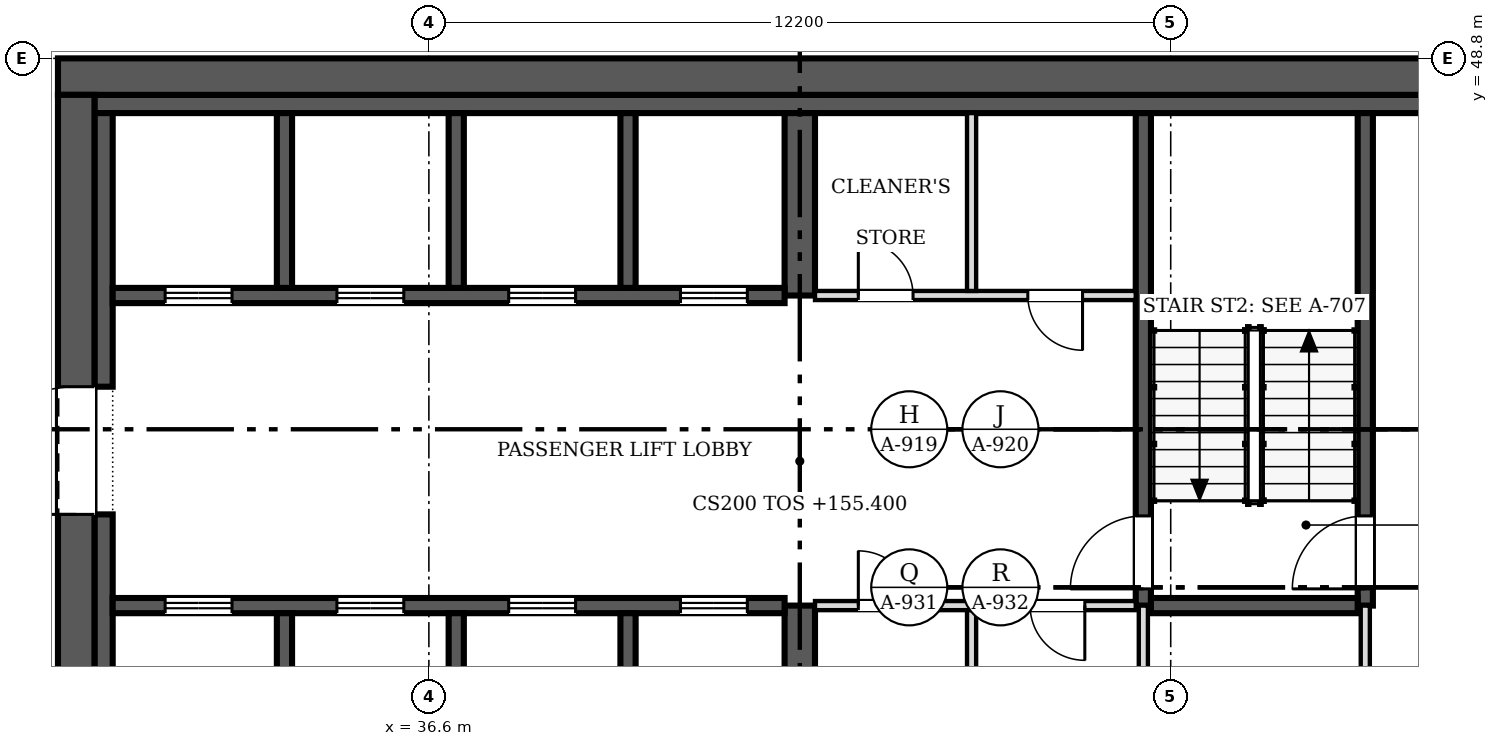
"""IFC4 building model, lengths in metres.
Left out: names, types, materials, properties, quantities, classifications, styles, units other than length and angle.
Written with IfcOpenShell. Run it as: python <this file> out.ifc"""

import sys

from ifc_helpers import new_model, si_unit, direction, frame, frame_2d, origin, place, context, subcontext, project, spatial, rectangle, extrude, source, transform, mapped, element, fill, save


model = new_model("IFC4")
c1 = context("Model", 3, precision=1e-05, world=origin(), true_north=direction((0.0, 1.0)))
c2 = subcontext(c1, "Body", "Model", "MODEL_VIEW")
j1 = project(units=[si_unit("LENGTHUNIT", "METRE"), si_unit("PLANEANGLEUNIT", "RADIAN")], contexts=[c1])
p1 = place(None, origin())
s1 = spatial("IfcSite", under=j1, at=p1, CompositionType="ELEMENT")
p2 = place(p1, origin())
s2 = spatial("IfcBuilding", under=s1, at=p2, CompositionType="ELEMENT")
p3 = place(p2, frame((0.0, 0.0, 155.4)))
s3 = spatial("IfcBuildingStorey", under=s2, at=p3, CompositionType="ELEMENT", Elevation=155.4)
p4 = place(p3, frame((30.8, 25.0, 0.0), z_axis=(0.0, 0.0, 1.0), x_axis=(0.0, 1.0, 0.0)))
e1 = element("IfcWall", 1, at=p4, inside=s3, PredefinedType="SHEAR", context=c2, shape_type="SweptSolid", body=[
    extrude(rectangle(XDim=23.2, YDim=0.6, at=frame_2d((11.6, 0.0))), origin(), (0.0, 0.0, 1.0), 3.8),
])
m1 = source(origin(), c2, "Body", "SweptSolid", [
    extrude(rectangle(XDim=2.1, YDim=2.4, at=frame_2d((1.05, 1.2))), frame((0.0, 0.31, 0.0), z_axis=(0.0, -1.0, 0.0), x_axis=(1.0, 0.0, 0.0)), (0.0, 0.0, 1.0), 0.62),
])
p5 = place(p4, frame((4.8, 0.0, 0.0)))
e2 = element("IfcOpeningElement", 2, at=p5, cuts=e1, PredefinedType="OPENING", context=c2, shape_type="MappedRepresentation", body=[
    mapped(m1, transform((0.0, 0.0, 0.0), scale=1.0)),
])
p6 = place(p4, frame((16.3, 0.0, 0.0)))
e3 = element("IfcOpeningElement", 3, at=p6, cuts=e1, PredefinedType="OPENING", context=c2, shape_type="MappedRepresentation", body=[
    mapped(m1, transform((0.0, 0.0, 0.0), scale=1.0)),
])
p7 = place(p3, frame((30.5, 48.5, 0.0), z_axis=(0.0, 0.0, 1.0), x_axis=(1.0, 0.0, 0.0)))
e4 = element("IfcWall", 4, at=p7, inside=s3, PredefinedType="SHEAR", context=c2, shape_type="SweptSolid", body=[
    extrude(rectangle(XDim=24.4, YDim=0.6, at=frame_2d((12.2, 0.0))), origin(), (0.0, 0.0, 1.0), 3.8),
])
p8 = place(p3, frame((31.1, 48.05, 0.0), z_axis=(0.0, 0.0, 1.0), x_axis=(1.0, 0.0, 0.0)))
e5 = element("IfcWall", 5, at=p8, inside=s3, PredefinedType="SOLIDWALL", context=c2, shape_type="SweptSolid", body=[
    extrude(rectangle(XDim=23.2, YDim=0.3, at=frame_2d((11.6, 0.0))), origin(), (0.0, 0.0, 1.0), 3.8),
])
p9 = place(p3, frame((31.25, 31.9, 0.0), z_axis=(0.0, 0.0, 1.0), x_axis=(0.0, 1.0, 0.0)))
e6 = element("IfcWall", 6, at=p9, inside=s3, PredefinedType="SOLIDWALL", context=c2, shape_type="SweptSolid", body=[
    extrude(rectangle(XDim=9.4, YDim=0.3, at=frame_2d((4.7, 0.0))), origin(), (0.0, 0.0, 1.0), 3.8),
])
p10 = place(p3, frame((31.25, 43.4, 0.0), z_axis=(0.0, 0.0, 1.0), x_axis=(0.0, 1.0, 0.0)))
e7 = element("IfcWall", 7, at=p10, inside=s3, PredefinedType="SOLIDWALL", context=c2, shape_type="SweptSolid", body=[
    extrude(rectangle(XDim=4.5, YDim=0.3, at=frame_2d((2.25, 0.0))), origin(), (0.0, 0.0, 1.0), 3.8),
])
p11 = place(p3, frame((42.7, 36.85, 0.0), z_axis=(0.0, 0.0, 1.0), x_axis=(0.0, 1.0, 0.0)))
e8 = element("IfcWall", 8, at=p11, inside=s3, PredefinedType="SHEAR", context=c2, shape_type="SweptSolid", body=[
    extrude(rectangle(XDim=2.95, YDim=0.5, at=frame_2d((1.475, 0.0))), origin(), (0.0, 0.0, 1.0), 3.8),
])
p12 = place(p3, frame((42.7, 44.9, 0.0), z_axis=(0.0, 0.0, 1.0), x_axis=(0.0, 1.0, 0.0)))
e9 = element("IfcWall", 9, at=p12, inside=s3, PredefinedType="SHEAR", context=c2, shape_type="SweptSolid", body=[
    extrude(rectangle(XDim=3.0, YDim=0.5, at=frame_2d((1.5, 0.0))), origin(), (0.0, 0.0, 1.0), 3.8),
])
p13 = place(p3, frame((31.4, 39.8, 0.0), z_axis=(0.0, 0.0, 1.0), x_axis=(1.0, 0.0, 0.0)))
e10 = element("IfcWall", 10, at=p13, inside=s3, PredefinedType="SOLIDWALL", context=c2, shape_type="SweptSolid", body=[
    extrude(rectangle(XDim=11.05, YDim=0.25, at=frame_2d((5.525, 0.0))), origin(), (0.0, 0.0, 1.0), 3.8),
])
m2 = source(origin(), c2, "Body", "SweptSolid", [
    extrude(rectangle(XDim=1.1, YDim=2.1, at=frame_2d((0.55, 1.05))), frame((0.0, 0.135, 0.0), z_axis=(0.0, -1.0, 0.0), x_axis=(1.0, 0.0, 0.0)), (0.0, 0.0, 1.0), 0.27),
])
p14 = place(p13, frame((0.863, 0.0, 0.0)))
e11 = element("IfcOpeningElement", 11, at=p14, cuts=e10, PredefinedType="OPENING", context=c2, shape_type="MappedRepresentation", body=[
    mapped(m2, transform((0.0, 0.0, 0.0), scale=1.0)),
])
p15 = place(p13, frame((3.688, 0.0, 0.0)))
e12 = element("IfcOpeningElement", 12, at=p15, cuts=e10, PredefinedType="OPENING", context=c2, shape_type="MappedRepresentation", body=[
    mapped(m2, transform((0.0, 0.0, 0.0), scale=1.0)),
])
p16 = place(p13, frame((6.512, 0.0, 0.0)))
e13 = element("IfcOpeningElement", 13, at=p16, cuts=e10, PredefinedType="OPENING", context=c2, shape_type="MappedRepresentation", body=[
    mapped(m2, transform((0.0, 0.0, 0.0), scale=1.0)),
])
p17 = place(p13, frame((9.337, 0.0, 0.0)))
e14 = element("IfcOpeningElement", 14, at=p17, cuts=e10, PredefinedType="OPENING", context=c2, shape_type="MappedRepresentation", body=[
    mapped(m2, transform((0.0, 0.0, 0.0), scale=1.0)),
])
p18 = place(p3, frame((42.45, 44.9, 0.0), z_axis=(0.0, 0.0, 1.0), x_axis=(-1.0, 0.0, 0.0)))
e15 = element("IfcWall", 15, at=p18, inside=s3, PredefinedType="SOLIDWALL", context=c2, shape_type="SweptSolid", body=[
    extrude(rectangle(XDim=11.05, YDim=0.25, at=frame_2d((5.525, 0.0))), origin(), (0.0, 0.0, 1.0), 3.8),
])
p19 = place(p18, frame((9.087, 0.0, 0.0)))
e16 = element("IfcOpeningElement", 16, at=p19, cuts=e15, PredefinedType="OPENING", context=c2, shape_type="MappedRepresentation", body=[
    mapped(m2, transform((0.0, 0.0, 0.0), scale=1.0)),
])
p20 = place(p18, frame((6.262, 0.0, 0.0)))
e17 = element("IfcOpeningElement", 17, at=p20, cuts=e15, PredefinedType="OPENING", context=c2, shape_type="MappedRepresentation", body=[
    mapped(m2, transform((0.0, 0.0, 0.0), scale=1.0)),
])
p21 = place(p18, frame((3.438, 0.0, 0.0)))
e18 = element("IfcOpeningElement", 18, at=p21, cuts=e15, PredefinedType="OPENING", context=c2, shape_type="MappedRepresentation", body=[
    mapped(m2, transform((0.0, 0.0, 0.0), scale=1.0)),
])
p22 = place(p18, frame((0.613, 0.0, 0.0)))
e19 = element("IfcOpeningElement", 19, at=p22, cuts=e15, PredefinedType="OPENING", context=c2, shape_type="MappedRepresentation", body=[
    mapped(m2, transform((0.0, 0.0, 0.0), scale=1.0)),
])
p23 = place(p3, frame((48.35, 47.9, 0.0), z_axis=(0.0, 0.0, 1.0), x_axis=(0.0, -1.0, 0.0)))
e20 = element("IfcWall", 20, at=p23, inside=s3, PredefinedType="SOLIDWALL", context=c2, shape_type="SweptSolid", body=[
    extrude(rectangle(XDim=8.1, YDim=0.25, at=frame_2d((4.05, 0.0))), origin(), (0.0, 0.0, 1.0), 3.8),
])
m3 = source(origin(), c2, "Body", "SweptSolid", [
    extrude(rectangle(XDim=1.2, YDim=2.1, at=frame_2d((0.6, 1.05))), frame((0.0, 0.135, 0.0), z_axis=(0.0, -1.0, 0.0), x_axis=(1.0, 0.0, 0.0)), (0.0, 0.0, 1.0), 0.27),
])
p24 = place(p23, frame((6.625, 0.0, 0.0)))
e21 = element("IfcOpeningElement", 21, at=p24, cuts=e20, PredefinedType="OPENING", context=c2, shape_type="MappedRepresentation", body=[
    mapped(m3, transform((0.0, 0.0, 0.0), scale=1.0)),
])
p25 = place(p3, frame((52.0, 39.8, 0.0), z_axis=(0.0, 0.0, 1.0), x_axis=(0.0, 1.0, 0.0)))
e22 = element("IfcWall", 22, at=p25, inside=s3, PredefinedType="SOLIDWALL", context=c2, shape_type="SweptSolid", body=[
    extrude(rectangle(XDim=8.1, YDim=0.25, at=frame_2d((4.05, 0.0))), origin(), (0.0, 0.0, 1.0), 3.8),
])
p26 = place(p25, frame((0.275, 0.0, 0.0)))
e23 = element("IfcOpeningElement", 23, at=p26, cuts=e22, PredefinedType="OPENING", context=c2, shape_type="MappedRepresentation", body=[
    mapped(m3, transform((0.0, 0.0, 0.0), scale=1.0)),
])
p27 = place(p3, frame((48.475, 39.8, 0.0), z_axis=(0.0, 0.0, 1.0), x_axis=(1.0, 0.0, 0.0)))
e24 = element("IfcWall", 24, at=p27, inside=s3, PredefinedType="SOLIDWALL", context=c2, shape_type="SweptSolid", body=[
    extrude(rectangle(XDim=3.4, YDim=0.25, at=frame_2d((1.7, 0.0))), origin(), (0.0, 0.0, 1.0), 3.8),
])
for number, where, z_axis, x_axis in (
    (25, (34.225, 36.85, 0.0), (0.0, 0.0, 1.0), (0.0, 1.0, 0.0)),
    (26, (37.05, 36.85, 0.0), (0.0, 0.0, 1.0), (0.0, 1.0, 0.0)),
    (27, (39.875, 36.85, 0.0), (0.0, 0.0, 1.0), (0.0, 1.0, 0.0)),
):
    element("IfcWall", number, at=place(p3, frame(where, z_axis=z_axis, x_axis=x_axis)), inside=s3, PredefinedType="SOLIDWALL", context=c2, shape_type="SweptSolid", body=[
        extrude(rectangle(XDim=2.825, YDim=0.25, at=frame_2d((1.413, 0.0))), origin(), (0.0, 0.0, 1.0), 3.8),
    ])
for number, where, z_axis, x_axis in (
    (28, (34.225, 45.025, 0.0), (0.0, 0.0, 1.0), (0.0, 1.0, 0.0)),
    (29, (37.05, 45.025, 0.0), (0.0, 0.0, 1.0), (0.0, 1.0, 0.0)),
    (30, (39.875, 45.025, 0.0), (0.0, 0.0, 1.0), (0.0, 1.0, 0.0)),
):
    element("IfcWall", number, at=place(p3, frame(where, z_axis=z_axis, x_axis=x_axis)), inside=s3, PredefinedType="SOLIDWALL", context=c2, shape_type="SweptSolid", body=[
        extrude(rectangle(XDim=2.875, YDim=0.25, at=frame_2d((1.438, 0.0))), origin(), (0.0, 0.0, 1.0), 3.8),
    ])
p28 = place(p3, frame((52.0, 33.525, 0.0), z_axis=(0.0, 0.0, 1.0), x_axis=(0.0, 1.0, 0.0)))
e31 = element("IfcWall", 31, at=p28, inside=s3, PredefinedType="PARTITIONING", context=c2, shape_type="SweptSolid", body=[
    extrude(rectangle(XDim=6.275, YDim=0.15, at=frame_2d((3.138, 0.0))), origin(), (0.0, 0.0, 1.0), 3.6),
])
m4 = source(origin(), c2, "Body", "SweptSolid", [
    extrude(rectangle(XDim=0.9, YDim=2.1, at=frame_2d((0.45, 1.05))), frame((0.0, 0.085, 0.0), z_axis=(0.0, -1.0, 0.0), x_axis=(1.0, 0.0, 0.0)), (0.0, 0.0, 1.0), 0.17),
])
p29 = place(p28, frame((1.025, 0.0, 0.0)))
e32 = element("IfcOpeningElement", 32, at=p29, cuts=e31, PredefinedType="OPENING", context=c2, shape_type="MappedRepresentation", body=[
    mapped(m4, transform((0.0, 0.0, 0.0), scale=1.0)),
])
p30 = place(p3, frame((48.225, 39.8, 0.0), z_axis=(0.0, 0.0, 1.0), x_axis=(-1.0, 0.0, 0.0)))
e33 = element("IfcWall", 33, at=p30, inside=s3, PredefinedType="PARTITIONING", context=c2, shape_type="SweptSolid", body=[
    extrude(rectangle(XDim=5.275, YDim=0.15, at=frame_2d((2.638, 0.0))), origin(), (0.0, 0.0, 1.0), 3.6),
])
p31 = place(p30, frame((3.663, 0.0, 0.0)))
e34 = element("IfcOpeningElement", 34, at=p31, cuts=e33, PredefinedType="OPENING", context=c2, shape_type="MappedRepresentation", body=[
    mapped(m4, transform((0.0, 0.0, 0.0), scale=1.0)),
])
p32 = place(p30, frame((0.837, 0.0, 0.0)))
e35 = element("IfcOpeningElement", 35, at=p32, cuts=e33, PredefinedType="OPENING", context=c2, shape_type="MappedRepresentation", body=[
    mapped(m4, transform((0.0, 0.0, 0.0), scale=1.0)),
])
p33 = place(p3, frame((42.95, 44.9, 0.0), z_axis=(0.0, 0.0, 1.0), x_axis=(1.0, 0.0, 0.0)))
e36 = element("IfcWall", 36, at=p33, inside=s3, PredefinedType="PARTITIONING", context=c2, shape_type="SweptSolid", body=[
    extrude(rectangle(XDim=5.275, YDim=0.15, at=frame_2d((2.638, 0.0))), origin(), (0.0, 0.0, 1.0), 3.6),
])
p34 = place(p33, frame((0.712, 0.0, 0.0)))
e37 = element("IfcOpeningElement", 37, at=p34, cuts=e36, PredefinedType="OPENING", context=c2, shape_type="MappedRepresentation", body=[
    mapped(m4, transform((0.0, 0.0, 0.0), scale=1.0)),
])
p35 = place(p33, frame((3.5, 0.0, 0.0)))
e38 = element("IfcOpeningElement", 38, at=p35, cuts=e36, PredefinedType="OPENING", context=c2, shape_type="MappedRepresentation", body=[
    mapped(m4, transform((0.0, 0.0, 0.0), scale=1.0)),
])
p36 = place(p3, frame((45.525, 36.85, 0.0), z_axis=(0.0, 0.0, 1.0), x_axis=(0.0, 1.0, 0.0)))
e39 = element("IfcWall", 39, at=p36, inside=s3, PredefinedType="PARTITIONING", context=c2, shape_type="SweptSolid", body=[
    extrude(rectangle(XDim=2.875, YDim=0.15, at=frame_2d((1.438, 0.0))), origin(), (0.0, 0.0, 1.0), 3.6),
])
p37 = place(p3, frame((48.35, 36.85, 0.0), z_axis=(0.0, 0.0, 1.0), x_axis=(0.0, 1.0, 0.0)))
e40 = element("IfcWall", 40, at=p37, inside=s3, PredefinedType="PARTITIONING", context=c2, shape_type="SweptSolid", body=[
    extrude(rectangle(XDim=2.95, YDim=0.15, at=frame_2d((1.475, 0.0))), origin(), (0.0, 0.0, 1.0), 3.6),
])
p38 = place(p3, frame((45.525, 44.975, 0.0), z_axis=(0.0, 0.0, 1.0), x_axis=(0.0, 1.0, 0.0)))
e41 = element("IfcWall", 41, at=p38, inside=s3, PredefinedType="PARTITIONING", context=c2, shape_type="SweptSolid", body=[
    extrude(rectangle(XDim=2.925, YDim=0.15, at=frame_2d((1.462, 0.0))), origin(), (0.0, 0.0, 1.0), 3.6),
])
m5 = source(origin(), c2, "Body", "SweptSolid", [
    extrude(rectangle(XDim=2.1, YDim=2.4, at=frame_2d((1.05, 1.2))), frame((0.0, 0.025, 0.0), z_axis=(0.0, -1.0, 0.0), x_axis=(1.0, 0.0, 0.0)), (0.0, 0.0, 1.0), 0.05),
])
p39 = place(p6, origin())
e42 = element("IfcDoor", 42, at=p39, inside=s3, OperationType="DOUBLE_DOOR_SINGLE_SWING", PredefinedType="DOOR", context=c2, shape_type="MappedRepresentation", body=[
    mapped(m5, transform((0.0, 0.0, 0.0), scale=1.0)),
])
fill(e3, e42)
m6 = source(origin(), c2, "Body", "SweptSolid", [
    extrude(rectangle(XDim=1.1, YDim=2.1, at=frame_2d((0.55, 1.05))), frame((0.0, 0.025, 0.0), z_axis=(0.0, -1.0, 0.0), x_axis=(1.0, 0.0, 0.0)), (0.0, 0.0, 1.0), 0.05),
])
p40 = place(p14, origin())
e43 = element("IfcDoor", 43, at=p40, inside=s3, OperationType="DOUBLE_DOOR_SLIDING", PredefinedType="DOOR", context=c2, shape_type="MappedRepresentation", body=[
    mapped(m6, transform((0.0, 0.0, 0.0), scale=1.0)),
])
fill(e11, e43)
p41 = place(p15, origin())
e44 = element("IfcDoor", 44, at=p41, inside=s3, OperationType="DOUBLE_DOOR_SLIDING", PredefinedType="DOOR", context=c2, shape_type="MappedRepresentation", body=[
    mapped(m6, transform((0.0, 0.0, 0.0), scale=1.0)),
])
fill(e12, e44)
p42 = place(p16, origin())
e45 = element("IfcDoor", 45, at=p42, inside=s3, OperationType="DOUBLE_DOOR_SLIDING", PredefinedType="DOOR", context=c2, shape_type="MappedRepresentation", body=[
    mapped(m6, transform((0.0, 0.0, 0.0), scale=1.0)),
])
fill(e13, e45)
p43 = place(p17, origin())
e46 = element("IfcDoor", 46, at=p43, inside=s3, OperationType="DOUBLE_DOOR_SLIDING", PredefinedType="DOOR", context=c2, shape_type="MappedRepresentation", body=[
    mapped(m6, transform((0.0, 0.0, 0.0), scale=1.0)),
])
fill(e14, e46)
p44 = place(p19, origin())
e47 = element("IfcDoor", 47, at=p44, inside=s3, OperationType="DOUBLE_DOOR_SLIDING", PredefinedType="DOOR", context=c2, shape_type="MappedRepresentation", body=[
    mapped(m6, transform((0.0, 0.0, 0.0), scale=1.0)),
])
fill(e16, e47)
p45 = place(p20, origin())
e48 = element("IfcDoor", 48, at=p45, inside=s3, OperationType="DOUBLE_DOOR_SLIDING", PredefinedType="DOOR", context=c2, shape_type="MappedRepresentation", body=[
    mapped(m6, transform((0.0, 0.0, 0.0), scale=1.0)),
])
fill(e17, e48)
p46 = place(p21, origin())
e49 = element("IfcDoor", 49, at=p46, inside=s3, OperationType="DOUBLE_DOOR_SLIDING", PredefinedType="DOOR", context=c2, shape_type="MappedRepresentation", body=[
    mapped(m6, transform((0.0, 0.0, 0.0), scale=1.0)),
])
fill(e18, e49)
p47 = place(p22, origin())
e50 = element("IfcDoor", 50, at=p47, inside=s3, OperationType="DOUBLE_DOOR_SLIDING", PredefinedType="DOOR", context=c2, shape_type="MappedRepresentation", body=[
    mapped(m6, transform((0.0, 0.0, 0.0), scale=1.0)),
])
fill(e19, e50)
m7 = source(origin(), c2, "Body", "SweptSolid", [
    extrude(rectangle(XDim=1.2, YDim=2.1, at=frame_2d((0.6, 1.05))), frame((0.0, 0.025, 0.0), z_axis=(0.0, -1.0, 0.0), x_axis=(1.0, 0.0, 0.0)), (0.0, 0.0, 1.0), 0.05),
])
p48 = place(p24, origin())
e51 = element("IfcDoor", 51, at=p48, inside=s3, OperationType="SINGLE_SWING_RIGHT", PredefinedType="DOOR", context=c2, shape_type="MappedRepresentation", body=[
    mapped(m7, transform((0.0, 0.0, 0.0), scale=1.0)),
])
fill(e21, e51)
p49 = place(p26, origin())
e52 = element("IfcDoor", 52, at=p49, inside=s3, OperationType="SINGLE_SWING_LEFT", PredefinedType="DOOR", context=c2, shape_type="MappedRepresentation", body=[
    mapped(m7, transform((0.0, 0.0, 0.0), scale=1.0)),
])
fill(e23, e52)
m8 = source(origin(), c2, "Body", "SweptSolid", [
    extrude(rectangle(XDim=0.9, YDim=2.1, at=frame_2d((0.45, 1.05))), frame((0.0, 0.025, 0.0), z_axis=(0.0, -1.0, 0.0), x_axis=(1.0, 0.0, 0.0)), (0.0, 0.0, 1.0), 0.05),
])
p50 = place(p31, origin())
e53 = element("IfcDoor", 53, at=p50, inside=s3, OperationType="SINGLE_SWING_RIGHT", PredefinedType="DOOR", context=c2, shape_type="MappedRepresentation", body=[
    mapped(m8, transform((0.0, 0.0, 0.0), scale=1.0)),
])
fill(e34, e53)
p51 = place(p32, origin())
e54 = element("IfcDoor", 54, at=p51, inside=s3, OperationType="SINGLE_SWING_LEFT", PredefinedType="DOOR", context=c2, shape_type="MappedRepresentation", body=[
    mapped(m8, transform((0.0, 0.0, 0.0), scale=1.0)),
])
fill(e35, e54)
p52 = place(p34, origin())
e55 = element("IfcDoor", 55, at=p52, inside=s3, OperationType="SINGLE_SWING_LEFT", PredefinedType="DOOR", context=c2, shape_type="MappedRepresentation", body=[
    mapped(m8, transform((0.0, 0.0, 0.0), scale=1.0)),
])
fill(e37, e55)
p53 = place(p35, origin())
e56 = element("IfcDoor", 56, at=p53, inside=s3, OperationType="SINGLE_SWING_RIGHT", PredefinedType="DOOR", context=c2, shape_type="MappedRepresentation", body=[
    mapped(m8, transform((0.0, 0.0, 0.0), scale=1.0)),
])
fill(e38, e56)
save(model, sys.argv[1])
